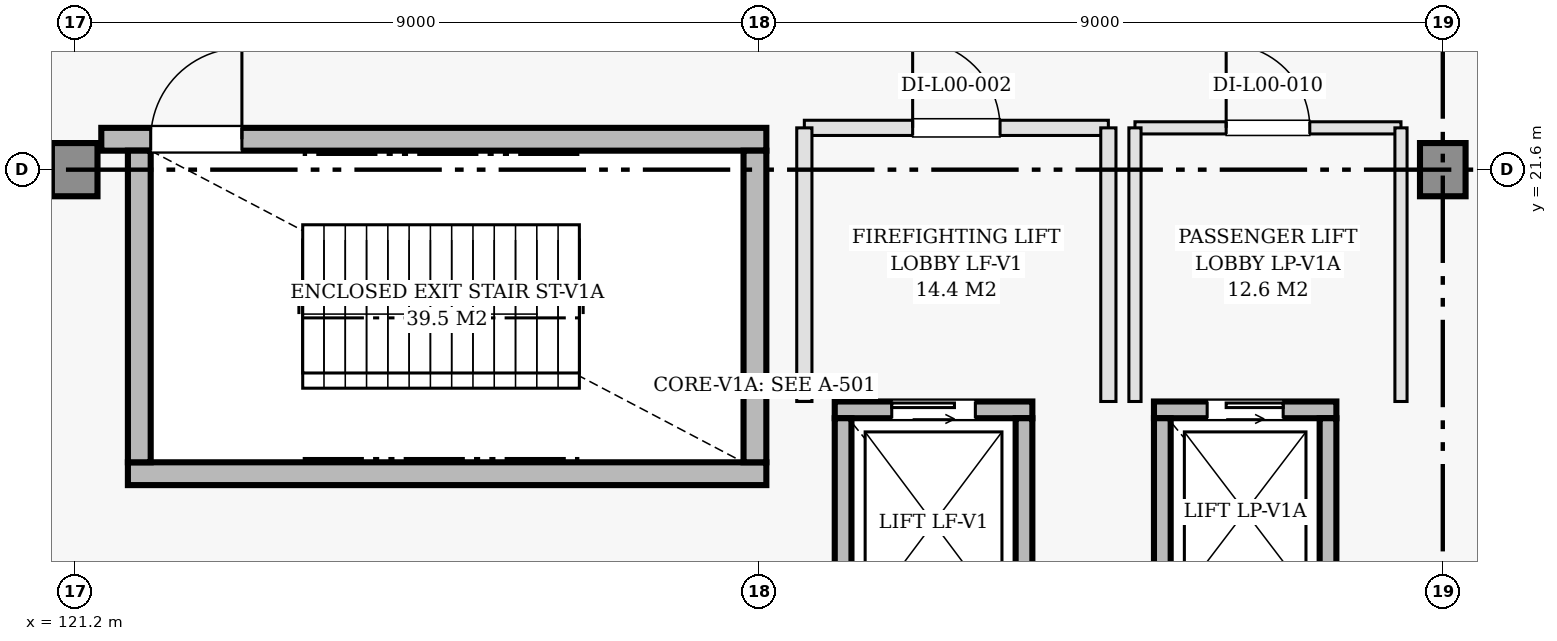
"""IFC4 building model, lengths in metres.
Left out: names, types, materials, properties, quantities, classifications, styles, units other than length and angle.
Written with IfcOpenShell. Run it as: python <this file> out.ifc"""

import sys

from ifc_helpers import new_model, si_unit, direction, frame, frame_2d, origin, origin_2d, place, context, subcontext, project, spatial, rectangle, extrude, element, fill, save


model = new_model("IFC4")
c1 = context("Model", 3, precision=1e-05, world=origin(), true_north=direction((0.0, 1.0)))
c2 = subcontext(c1, "Body", "Model", "MODEL_VIEW")
j1 = project(units=[si_unit("LENGTHUNIT", "METRE"), si_unit("PLANEANGLEUNIT", "RADIAN")], contexts=[c1])
p1 = place(None, origin())
s1 = spatial("IfcSite", under=j1, at=p1, CompositionType="ELEMENT")
p2 = place(p1, origin())
s2 = spatial("IfcBuilding", under=s1, at=p2, CompositionType="ELEMENT")
p3 = place(p2, origin())
s3 = spatial("IfcBuildingStorey", under=s2, at=p3, CompositionType="ELEMENT", Elevation=0.0)
for number, where, z_axis, x_axis in (
    (1, (121.2, 21.6, 0.0), (0.0, 0.0, 1.0), (1.0, 0.0, 0.0)),
    (2, (139.2, 21.6, 0.0), (0.0, 0.0, 1.0), (1.0, 0.0, 0.0)),
):
    element("IfcColumn", number, at=place(p3, frame(where, z_axis=z_axis, x_axis=x_axis)), inside=s3, PredefinedType="COLUMN", context=c2, shape_type="SweptSolid", body=[
        extrude(rectangle(XDim=0.7, YDim=0.7, at=origin_2d()), origin(), (0.0, 0.0, 1.0), 4.8),
    ])
p4 = place(p3, frame((121.9, 17.6, 0.0), z_axis=(0.0, 0.0, 1.0), x_axis=(1.0, 0.0, 0.0)))
e3 = element("IfcWall", 3, at=p4, inside=s3, PredefinedType="SHEAR", context=c2, shape_type="SweptSolid", body=[
    extrude(rectangle(XDim=8.4, YDim=0.3, at=frame_2d((4.2, 0.0))), origin(), (0.0, 0.0, 1.0), 4.52),
])
p5 = place(p3, frame((121.55, 22.0, 0.0), z_axis=(0.0, 0.0, 1.0), x_axis=(1.0, 0.0, 0.0)))
e4 = element("IfcWall", 4, at=p5, inside=s3, PredefinedType="SHEAR", context=c2, shape_type="SweptSolid", body=[
    extrude(rectangle(XDim=8.75, YDim=0.3, at=frame_2d((4.375, 0.0))), origin(), (0.0, 0.0, 1.0), 4.52),
])
p6 = place(p5, frame((0.65, 0.0, 0.0)))
e5 = element("IfcOpeningElement", 5, at=p6, cuts=e4, PredefinedType="OPENING", context=c2, shape_type="SweptSolid", body=[
    extrude(rectangle(XDim=1.2, YDim=2.15, at=frame_2d((0.6, 1.075))), frame((0.0, 0.16, 0.0), z_axis=(0.0, -1.0, 0.0), x_axis=(1.0, 0.0, 0.0)), (0.0, 0.0, 1.0), 0.32),
])
for number, where, z_axis, x_axis in (
    (6, (122.05, 17.75, 0.0), (0.0, 0.0, 1.0), (0.0, 1.0, 0.0)),
    (7, (130.15, 17.75, 0.0), (0.0, 0.0, 1.0), (0.0, 1.0, 0.0)),
):
    element("IfcWall", number, at=place(p3, frame(where, z_axis=z_axis, x_axis=x_axis)), inside=s3, PredefinedType="SHEAR", context=c2, shape_type="SweptSolid", body=[
        extrude(rectangle(XDim=4.1, YDim=0.3, at=frame_2d((2.05, 0.0))), origin(), (0.0, 0.0, 1.0), 4.52),
    ])
p7 = place(p3, frame((131.2, 18.44, 0.0), z_axis=(0.0, 0.0, 1.0), x_axis=(1.0, 0.0, 0.0)))
e8 = element("IfcWall", 8, at=p7, inside=s3, PredefinedType="SHEAR", context=c2, shape_type="SweptSolid", body=[
    extrude(rectangle(XDim=2.6, YDim=0.22, at=frame_2d((1.3, 0.0))), origin(), (0.0, 0.0, 1.0), 4.52),
])
p8 = place(p7, frame((0.75, 0.0, 0.0)))
e9 = element("IfcOpeningElement", 9, at=p8, cuts=e8, PredefinedType="OPENING", context=c2, shape_type="SweptSolid", body=[
    extrude(rectangle(XDim=1.1, YDim=2.15, at=frame_2d((0.55, 1.075))), frame((0.0, 0.12, 0.0), z_axis=(0.0, -1.0, 0.0), x_axis=(1.0, 0.0, 0.0)), (0.0, 0.0, 1.0), 0.24),
])
for number, where, z_axis, x_axis in (
    (10, (131.31, 15.57, 0.0), (0.0, 0.0, 1.0), (0.0, 1.0, 0.0)),
    (11, (133.69, 15.57, 0.0), (0.0, 0.0, 1.0), (0.0, 1.0, 0.0)),
):
    element("IfcWall", number, at=place(p3, frame(where, z_axis=z_axis, x_axis=x_axis)), inside=s3, PredefinedType="SHEAR", context=c2, shape_type="SweptSolid", body=[
        extrude(rectangle(XDim=2.76, YDim=0.22, at=frame_2d((1.38, 0.0))), origin(), (0.0, 0.0, 1.0), 4.52),
    ])
p9 = place(p3, frame((130.8, 22.15, 0.0), z_axis=(0.0, 0.0, 1.0), x_axis=(1.0, 0.0, 0.0)))
e12 = element("IfcWall", 12, at=p9, inside=s3, PredefinedType="PARTITIONING", context=c2, shape_type="SweptSolid", body=[
    extrude(rectangle(XDim=4.0, YDim=0.2, at=frame_2d((2.0, 0.0))), origin(), (0.0, 0.0, 1.0), 4.52),
])
p10 = place(p9, frame((1.425, 0.0, 0.0)))
e13 = element("IfcOpeningElement", 13, at=p10, cuts=e12, PredefinedType="OPENING", context=c2, shape_type="SweptSolid", body=[
    extrude(rectangle(XDim=1.15, YDim=2.15, at=frame_2d((0.575, 1.075))), frame((0.0, 0.11, 0.0), z_axis=(0.0, -1.0, 0.0), x_axis=(1.0, 0.0, 0.0)), (0.0, 0.0, 1.0), 0.22),
])
for number, where, z_axis, x_axis in (
    (14, (130.8, 18.55, 0.0), (0.0, 0.0, 1.0), (0.0, 1.0, 0.0)),
    (15, (134.8, 18.55, 0.0), (0.0, 0.0, 1.0), (0.0, 1.0, 0.0)),
):
    element("IfcWall", number, at=place(p3, frame(where, z_axis=z_axis, x_axis=x_axis)), inside=s3, PredefinedType="PARTITIONING", context=c2, shape_type="SweptSolid", body=[
        extrude(rectangle(XDim=3.6, YDim=0.2, at=frame_2d((1.8, 0.0))), origin(), (0.0, 0.0, 1.0), 4.52),
    ])
p11 = place(p3, frame((135.4, 18.44, 0.0), z_axis=(0.0, 0.0, 1.0), x_axis=(1.0, 0.0, 0.0)))
e16 = element("IfcWall", 16, at=p11, inside=s3, PredefinedType="SHEAR", context=c2, shape_type="SweptSolid", body=[
    extrude(rectangle(XDim=2.4, YDim=0.22, at=frame_2d((1.2, 0.0))), origin(), (0.0, 0.0, 1.0), 4.52),
])
p12 = place(p11, frame((0.7, 0.0, 0.0)))
e17 = element("IfcOpeningElement", 17, at=p12, cuts=e16, PredefinedType="OPENING", context=c2, shape_type="SweptSolid", body=[
    extrude(rectangle(XDim=1.0, YDim=2.15, at=frame_2d((0.5, 1.075))), frame((0.0, 0.12, 0.0), z_axis=(0.0, -1.0, 0.0), x_axis=(1.0, 0.0, 0.0)), (0.0, 0.0, 1.0), 0.24),
])
for number, where, z_axis, x_axis in (
    (18, (135.51, 15.87, 0.0), (0.0, 0.0, 1.0), (0.0, 1.0, 0.0)),
    (19, (137.69, 15.87, 0.0), (0.0, 0.0, 1.0), (0.0, 1.0, 0.0)),
):
    element("IfcWall", number, at=place(p3, frame(where, z_axis=z_axis, x_axis=x_axis)), inside=s3, PredefinedType="SHEAR", context=c2, shape_type="SweptSolid", body=[
        extrude(rectangle(XDim=2.46, YDim=0.22, at=frame_2d((1.23, 0.0))), origin(), (0.0, 0.0, 1.0), 4.52),
    ])
p13 = place(p3, frame((135.15, 22.15, 0.0), z_axis=(0.0, 0.0, 1.0), x_axis=(1.0, 0.0, 0.0)))
e20 = element("IfcWall", 20, at=p13, inside=s3, PredefinedType="PARTITIONING", context=c2, shape_type="SweptSolid", body=[
    extrude(rectangle(XDim=3.5, YDim=0.16, at=frame_2d((1.75, 0.0))), origin(), (0.0, 0.0, 1.0), 4.52),
])
p14 = place(p13, frame((1.2, 0.0, 0.0)))
e21 = element("IfcOpeningElement", 21, at=p14, cuts=e20, PredefinedType="OPENING", context=c2, shape_type="SweptSolid", body=[
    extrude(rectangle(XDim=1.1, YDim=2.15, at=frame_2d((0.55, 1.075))), frame((0.0, 0.09, 0.0), z_axis=(0.0, -1.0, 0.0), x_axis=(1.0, 0.0, 0.0)), (0.0, 0.0, 1.0), 0.18),
])
for number, where, z_axis, x_axis in (
    (22, (135.15, 18.55, 0.0), (0.0, 0.0, 1.0), (0.0, 1.0, 0.0)),
    (23, (138.65, 18.55, 0.0), (0.0, 0.0, 1.0), (0.0, 1.0, 0.0)),
):
    element("IfcWall", number, at=place(p3, frame(where, z_axis=z_axis, x_axis=x_axis)), inside=s3, PredefinedType="PARTITIONING", context=c2, shape_type="SweptSolid", body=[
        extrude(rectangle(XDim=3.6, YDim=0.16, at=frame_2d((1.8, 0.0))), origin(), (0.0, 0.0, 1.0), 4.52),
    ])
p15 = place(p6, origin())
e24 = element("IfcDoor", 24, at=p15, inside=s3, OperationType="SINGLE_SWING_RIGHT", PredefinedType="DOOR", context=c2, shape_type="SweptSolid", body=[
    extrude(rectangle(XDim=1.2, YDim=2.15, at=frame_2d((0.6, 1.075))), frame((0.0, 0.025, 0.0), z_axis=(0.0, -1.0, 0.0), x_axis=(1.0, 0.0, 0.0)), (0.0, 0.0, 1.0), 0.05),
])
fill(e5, e24)
p16 = place(p8, origin())
e25 = element("IfcDoor", 25, at=p16, inside=s3, OperationType="SLIDING_TO_LEFT", PredefinedType="DOOR", context=c2, shape_type="SweptSolid", body=[
    extrude(rectangle(XDim=1.1, YDim=2.15, at=frame_2d((0.55, 1.075))), frame((0.0, 0.025, 0.0), z_axis=(0.0, -1.0, 0.0), x_axis=(1.0, 0.0, 0.0)), (0.0, 0.0, 1.0), 0.05),
])
fill(e9, e25)
p17 = place(p10, origin())
e26 = element("IfcDoor", 26, at=p17, inside=s3, OperationType="SINGLE_SWING_LEFT", PredefinedType="DOOR", context=c2, shape_type="SweptSolid", body=[
    extrude(rectangle(XDim=1.15, YDim=2.15, at=frame_2d((0.575, 1.075))), frame((0.0, 0.025, 0.0), z_axis=(0.0, -1.0, 0.0), x_axis=(1.0, 0.0, 0.0)), (0.0, 0.0, 1.0), 0.05),
])
fill(e13, e26)
p18 = place(p12, origin())
e27 = element("IfcDoor", 27, at=p18, inside=s3, OperationType="SLIDING_TO_RIGHT", PredefinedType="DOOR", context=c2, shape_type="SweptSolid", body=[
    extrude(rectangle(XDim=1.0, YDim=2.15, at=frame_2d((0.5, 1.075))), frame((0.0, 0.025, 0.0), z_axis=(0.0, -1.0, 0.0), x_axis=(1.0, 0.0, 0.0)), (0.0, 0.0, 1.0), 0.05),
])
fill(e17, e27)
p19 = place(p14, origin())
e28 = element("IfcDoor", 28, at=p19, inside=s3, OperationType="SINGLE_SWING_LEFT", PredefinedType="DOOR", context=c2, shape_type="SweptSolid", body=[
    extrude(rectangle(XDim=1.1, YDim=2.15, at=frame_2d((0.55, 1.075))), frame((0.0, 0.025, 0.0), z_axis=(0.0, -1.0, 0.0), x_axis=(1.0, 0.0, 0.0)), (0.0, 0.0, 1.0), 0.05),
])
fill(e21, e28)
save(model, sys.argv[1])
